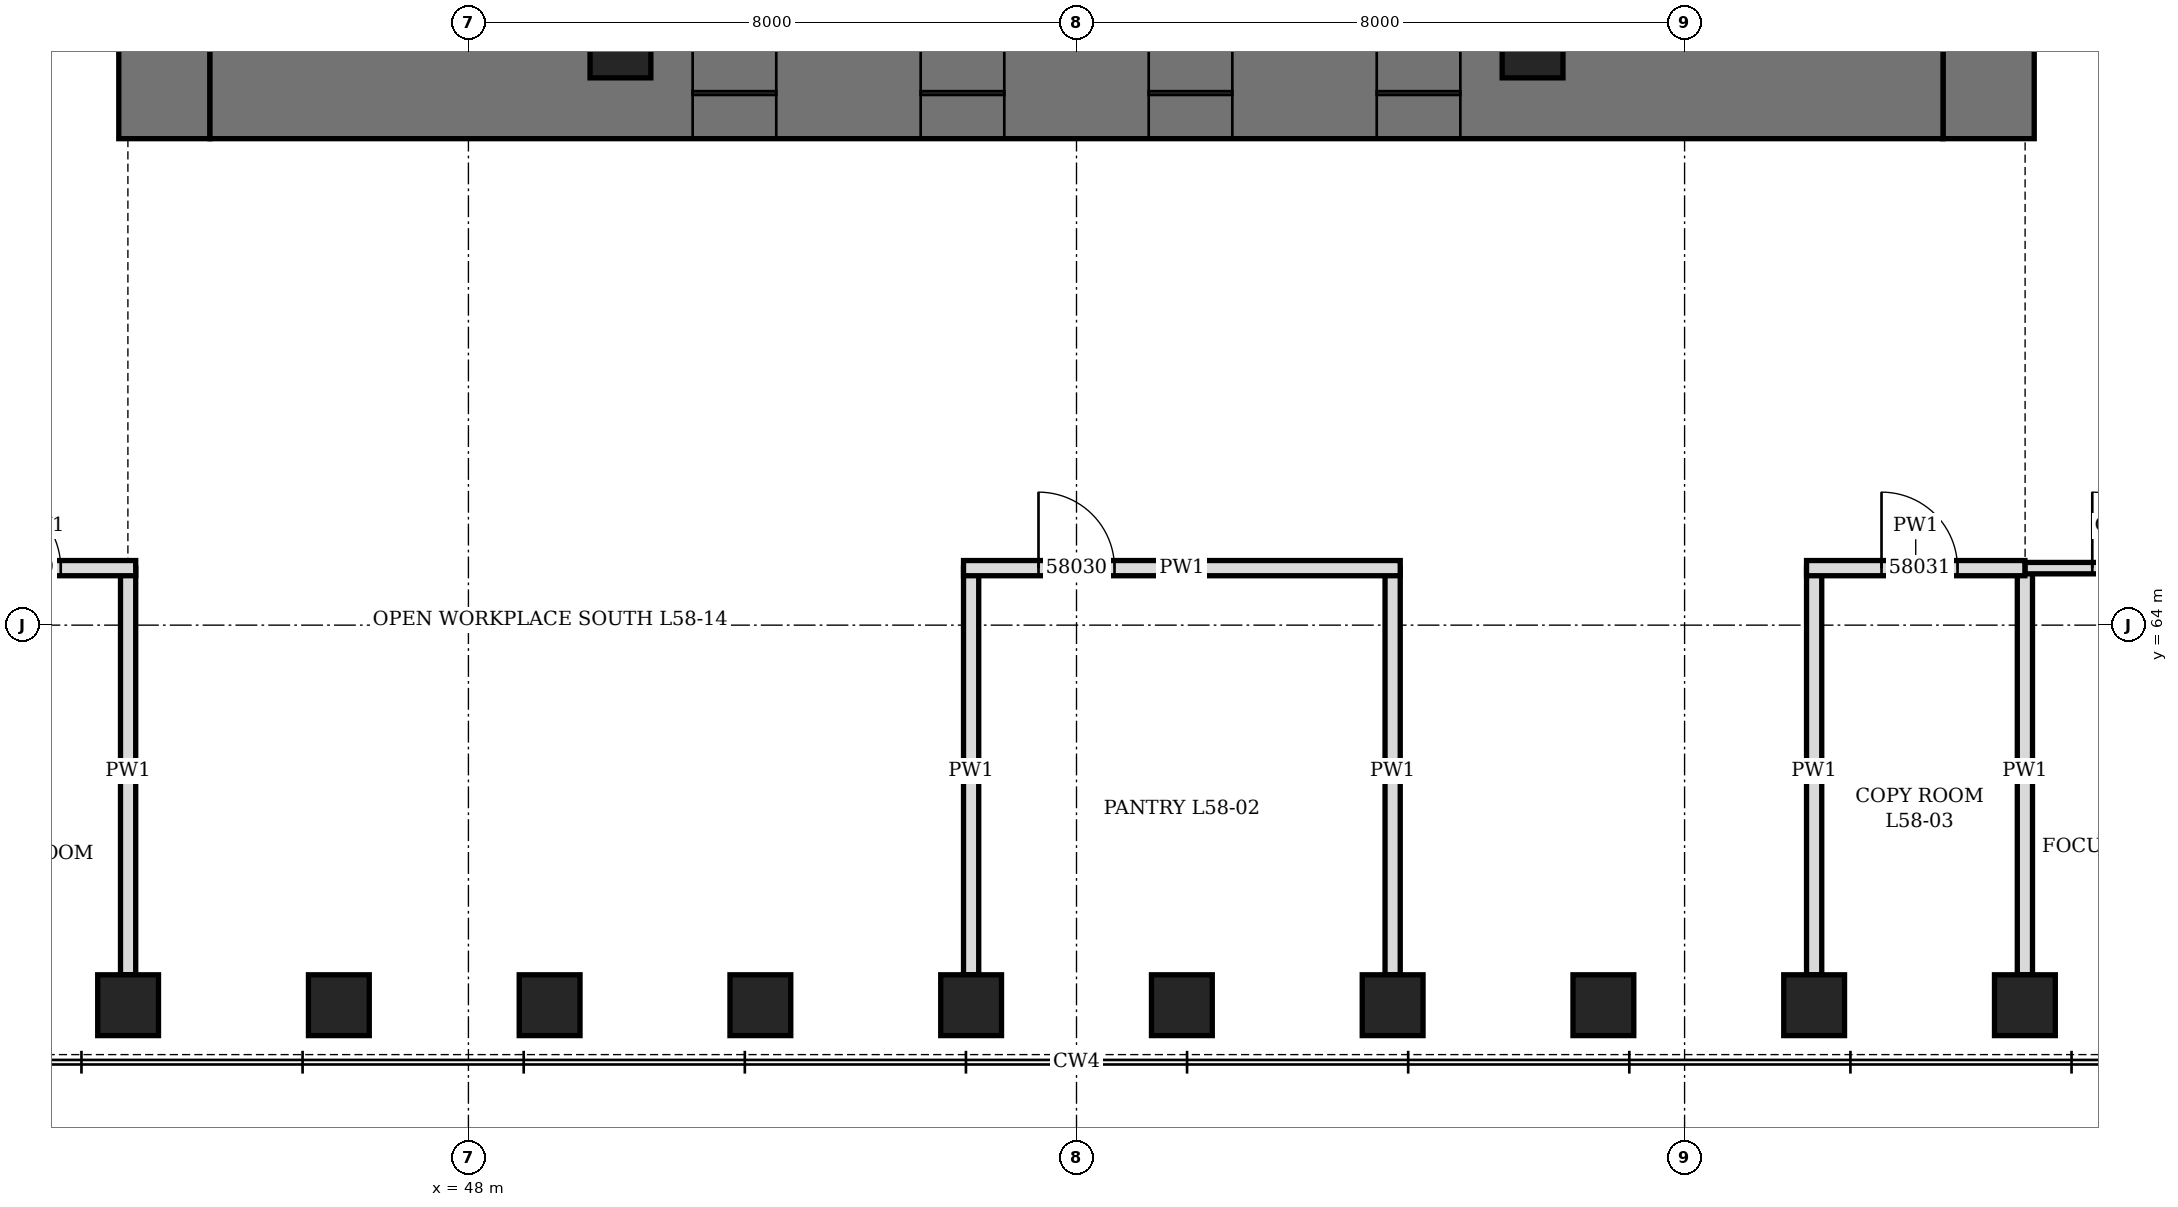
"""IFC4 building model, lengths in metres.
Left out: names, types, materials, properties, quantities, classifications, styles, units other than length and angle.
Written with IfcOpenShell. Run it as: python <this file> out.ifc"""

import sys

from ifc_helpers import new_model, si_unit, direction, frame, frame_2d, origin, origin_2d, place, context, subcontext, project, spatial, rectangle, hollow_rectangle, extrude, element, fill, save


model = new_model("IFC4")
c1 = context("Model", 3, precision=1e-05, world=origin(), true_north=direction((0.0, 1.0)))
c2 = subcontext(c1, "Body", "Model", "MODEL_VIEW")
j1 = project(units=[si_unit("LENGTHUNIT", "METRE"), si_unit("PLANEANGLEUNIT", "RADIAN")], contexts=[c1])
p1 = place(None, origin())
s1 = spatial("IfcSite", under=j1, at=p1, CompositionType="ELEMENT")
p2 = place(p1, origin())
s2 = spatial("IfcBuilding", under=s1, at=p2, CompositionType="ELEMENT")
p3 = place(p2, frame((0.0, 0.0, 258.7)))
s3 = spatial("IfcBuildingStorey", under=s2, at=p3, CompositionType="ELEMENT", Elevation=258.7)
for number, where, z_axis, x_axis in (
    (1, (43.523, 59.0, 0.0), (0.0, 0.0, 1.0), (1.0, 0.0, 0.0)),
    (2, (46.295, 59.0, 0.0), (0.0, 0.0, 1.0), (1.0, 0.0, 0.0)),
    (3, (49.068, 59.0, 0.0), (0.0, 0.0, 1.0), (1.0, 0.0, 0.0)),
    (4, (51.841, 59.0, 0.0), (0.0, 0.0, 1.0), (1.0, 0.0, 0.0)),
    (5, (54.614, 59.0, 0.0), (0.0, 0.0, 1.0), (1.0, 0.0, 0.0)),
    (6, (57.386, 59.0, 0.0), (0.0, 0.0, 1.0), (1.0, 0.0, 0.0)),
    (7, (60.159, 59.0, 0.0), (0.0, 0.0, 1.0), (1.0, 0.0, 0.0)),
    (8, (62.932, 59.0, 0.0), (0.0, 0.0, 1.0), (1.0, 0.0, 0.0)),
    (9, (65.705, 59.0, 0.0), (0.0, 0.0, 1.0), (1.0, 0.0, 0.0)),
    (10, (68.477, 59.0, 0.0), (0.0, 0.0, 1.0), (1.0, 0.0, 0.0)),
):
    element("IfcColumn", number, at=place(p3, frame(where, z_axis=z_axis, x_axis=x_axis)), inside=s3, PredefinedType="COLUMN", context=c2, shape_type="SweptSolid", body=[
        extrude(hollow_rectangle(XDim=0.8, YDim=0.8, WallThickness=0.1, at=origin_2d()), origin(), (0.0, 0.0, 1.0), 4.2),
    ])
p4 = place(p3, frame((44.0, 70.4, 0.0), z_axis=(0.0, 0.0, 1.0), x_axis=(0.0, 1.0, 0.0)))
e11 = element("IfcWall", 11, at=p4, inside=s3, PredefinedType="SHEAR", context=c2, shape_type="SweptSolid", body=[
    extrude(rectangle(XDim=19.2, YDim=1.2, at=frame_2d((9.6, 0.0))), origin(), (0.0, 0.0, 1.0), 4.2),
])
p5 = place(p4, frame((8.6, 0.0, 0.0)))
e12 = element("IfcOpeningElement", 12, at=p5, cuts=e11, PredefinedType="OPENING", context=c2, shape_type="SweptSolid", body=[
    extrude(rectangle(XDim=2.0, YDim=2.4, at=frame_2d((1.0, 1.2))), frame((0.0, 0.61, 0.0), z_axis=(0.0, -1.0, 0.0), x_axis=(1.0, 0.0, 0.0)), (0.0, 0.0, 1.0), 1.22),
])
p6 = place(p3, frame((68.0, 70.4, 0.0), z_axis=(0.0, 0.0, 1.0), x_axis=(0.0, 1.0, 0.0)))
e13 = element("IfcWall", 13, at=p6, inside=s3, PredefinedType="SHEAR", context=c2, shape_type="SweptSolid", body=[
    extrude(rectangle(XDim=19.2, YDim=1.2, at=frame_2d((9.6, 0.0))), origin(), (0.0, 0.0, 1.0), 4.2),
])
p7 = place(p6, frame((8.6, 0.0, 0.0)))
e14 = element("IfcOpeningElement", 14, at=p7, cuts=e13, PredefinedType="OPENING", context=c2, shape_type="SweptSolid", body=[
    extrude(rectangle(XDim=2.0, YDim=2.4, at=frame_2d((1.0, 1.2))), frame((0.0, 0.61, 0.0), z_axis=(0.0, -1.0, 0.0), x_axis=(1.0, 0.0, 0.0)), (0.0, 0.0, 1.0), 1.22),
])
p8 = place(p3, frame((44.6, 71.0, 0.0), z_axis=(0.0, 0.0, 1.0), x_axis=(1.0, 0.0, 0.0)))
e15 = element("IfcWall", 15, at=p8, inside=s3, PredefinedType="SHEAR", context=c2, shape_type="SweptSolid", body=[
    extrude(rectangle(XDim=22.8, YDim=1.2, at=frame_2d((11.4, 0.0))), origin(), (0.0, 0.0, 1.0), 4.2),
])
p9 = place(p8, frame((6.35, 0.0, 0.0)))
e16 = element("IfcOpeningElement", 16, at=p9, cuts=e15, PredefinedType="OPENING", context=c2, shape_type="SweptSolid", body=[
    extrude(rectangle(XDim=1.1, YDim=2.2, at=frame_2d((0.55, 1.1))), frame((0.0, 0.61, 0.0), z_axis=(0.0, -1.0, 0.0), x_axis=(1.0, 0.0, 0.0)), (0.0, 0.0, 1.0), 1.22),
])
p10 = place(p8, frame((9.35, 0.0, 0.0)))
e17 = element("IfcOpeningElement", 17, at=p10, cuts=e15, PredefinedType="OPENING", context=c2, shape_type="SweptSolid", body=[
    extrude(rectangle(XDim=1.1, YDim=2.2, at=frame_2d((0.55, 1.1))), frame((0.0, 0.61, 0.0), z_axis=(0.0, -1.0, 0.0), x_axis=(1.0, 0.0, 0.0)), (0.0, 0.0, 1.0), 1.22),
])
p11 = place(p8, frame((12.35, 0.0, 0.0)))
e18 = element("IfcOpeningElement", 18, at=p11, cuts=e15, PredefinedType="OPENING", context=c2, shape_type="SweptSolid", body=[
    extrude(rectangle(XDim=1.1, YDim=2.2, at=frame_2d((0.55, 1.1))), frame((0.0, 0.61, 0.0), z_axis=(0.0, -1.0, 0.0), x_axis=(1.0, 0.0, 0.0)), (0.0, 0.0, 1.0), 1.22),
])
p12 = place(p8, frame((15.35, 0.0, 0.0)))
e19 = element("IfcOpeningElement", 19, at=p12, cuts=e15, PredefinedType="OPENING", context=c2, shape_type="SweptSolid", body=[
    extrude(rectangle(XDim=1.1, YDim=2.2, at=frame_2d((0.55, 1.1))), frame((0.0, 0.61, 0.0), z_axis=(0.0, -1.0, 0.0), x_axis=(1.0, 0.0, 0.0)), (0.0, 0.0, 1.0), 1.22),
])
for number, where, z_axis, x_axis in (
    (20, (50.0, 71.6, 0.0), (0.0, 0.0, 1.0), (1.0, 0.0, 0.0)),
    (21, (62.0, 71.6, 0.0), (0.0, 0.0, 1.0), (1.0, 0.0, 0.0)),
):
    element("IfcColumn", number, at=place(p3, frame(where, z_axis=z_axis, x_axis=x_axis)), inside=s3, PredefinedType="COLUMN", context=c2, shape_type="SweptSolid", body=[
        extrude(hollow_rectangle(XDim=0.8, YDim=0.8, WallThickness=0.1, at=origin_2d()), origin(), (0.0, 0.0, 1.0), 4.2),
    ])
for number, where, z_axis, x_axis in (
    (22, (43.523, 59.4, 0.0), (0.0, 0.0, 1.0), (0.0, 1.0, 0.0)),
    (23, (54.614, 59.4, 0.0), (0.0, 0.0, 1.0), (0.0, 1.0, 0.0)),
    (24, (60.159, 59.4, 0.0), (0.0, 0.0, 1.0), (0.0, 1.0, 0.0)),
    (25, (65.705, 59.4, 0.0), (0.0, 0.0, 1.0), (0.0, 1.0, 0.0)),
    (26, (68.477, 59.4, 0.0), (0.0, 0.0, 1.0), (0.0, 1.0, 0.0)),
):
    element("IfcWall", number, at=place(p3, frame(where, z_axis=z_axis, x_axis=x_axis)), inside=s3, PredefinedType="PARTITIONING", context=c2, shape_type="SweptSolid", body=[
        extrude(rectangle(XDim=5.35, YDim=0.2, at=frame_2d((2.675, 0.0))), origin(), (0.0, 0.0, 1.0), 3.428),
    ])
p13 = place(p3, frame((68.477, 64.75, 0.0), z_axis=(0.0, 0.0, 1.0), x_axis=(1.0, 0.0, 0.0)))
e27 = element("IfcWall", 27, at=p13, inside=s3, PredefinedType="PARTITIONING", context=c2, shape_type="SweptSolid", body=[
    extrude(rectangle(XDim=2.373, YDim=0.15, at=frame_2d((1.187, 0.0))), origin(), (0.0, 0.0, 1.0), 4.04),
])
p14 = place(p13, frame((0.886, 0.0, 0.0)))
e28 = element("IfcOpeningElement", 28, at=p14, cuts=e27, PredefinedType="OPENING", context=c2, shape_type="SweptSolid", body=[
    extrude(rectangle(XDim=1.0, YDim=2.4, at=frame_2d((0.5, 1.2))), frame((0.0, 0.085, 0.0), z_axis=(0.0, -1.0, 0.0), x_axis=(1.0, 0.0, 0.0)), (0.0, 0.0, 1.0), 0.17),
])
p15 = place(p3, frame((41.15, 64.75, 0.0), z_axis=(0.0, 0.0, 1.0), x_axis=(1.0, 0.0, 0.0)))
e29 = element("IfcWall", 29, at=p15, inside=s3, PredefinedType="PARTITIONING", context=c2, shape_type="SweptSolid", body=[
    extrude(rectangle(XDim=2.473, YDim=0.2, at=frame_2d((1.236, 0.0))), origin(), (0.0, 0.0, 1.0), 4.04),
])
p16 = place(p15, frame((0.486, 0.0, 0.0)))
e30 = element("IfcOpeningElement", 30, at=p16, cuts=e29, PredefinedType="OPENING", context=c2, shape_type="SweptSolid", body=[
    extrude(rectangle(XDim=1.0, YDim=2.1, at=frame_2d((0.5, 1.05))), frame((0.0, 0.11, 0.0), z_axis=(0.0, -1.0, 0.0), x_axis=(1.0, 0.0, 0.0)), (0.0, 0.0, 1.0), 0.22),
])
p17 = place(p3, frame((54.514, 64.75, 0.0), z_axis=(0.0, 0.0, 1.0), x_axis=(1.0, 0.0, 0.0)))
e31 = element("IfcWall", 31, at=p17, inside=s3, PredefinedType="PARTITIONING", context=c2, shape_type="SweptSolid", body=[
    extrude(rectangle(XDim=5.745, YDim=0.2, at=frame_2d((2.873, 0.0))), origin(), (0.0, 0.0, 1.0), 4.04),
])
p18 = place(p17, frame((0.986, 0.0, 0.0)))
e32 = element("IfcOpeningElement", 32, at=p18, cuts=e31, PredefinedType="OPENING", context=c2, shape_type="SweptSolid", body=[
    extrude(rectangle(XDim=1.0, YDim=2.1, at=frame_2d((0.5, 1.05))), frame((0.0, 0.11, 0.0), z_axis=(0.0, -1.0, 0.0), x_axis=(1.0, 0.0, 0.0)), (0.0, 0.0, 1.0), 0.22),
])
p19 = place(p3, frame((65.604, 64.75, 0.0), z_axis=(0.0, 0.0, 1.0), x_axis=(1.0, 0.0, 0.0)))
e33 = element("IfcWall", 33, at=p19, inside=s3, PredefinedType="PARTITIONING", context=c2, shape_type="SweptSolid", body=[
    extrude(rectangle(XDim=2.873, YDim=0.2, at=frame_2d((1.437, 0.0))), origin(), (0.0, 0.0, 1.0), 4.04),
])
p20 = place(p19, frame((0.986, 0.0, 0.0)))
e34 = element("IfcOpeningElement", 34, at=p20, cuts=e33, PredefinedType="OPENING", context=c2, shape_type="SweptSolid", body=[
    extrude(rectangle(XDim=1.0, YDim=2.1, at=frame_2d((0.5, 1.05))), frame((0.0, 0.11, 0.0), z_axis=(0.0, -1.0, 0.0), x_axis=(1.0, 0.0, 0.0)), (0.0, 0.0, 1.0), 0.22),
])
p21 = place(p9, origin())
e35 = element("IfcDoor", 35, at=p21, inside=s3, OperationType="SLIDING_TO_LEFT", PredefinedType="DOOR", context=c2, shape_type="SweptSolid", body=[
    extrude(rectangle(XDim=1.1, YDim=2.2, at=frame_2d((0.55, 1.1))), frame((0.0, 0.35, 0.0), z_axis=(0.0, -1.0, 0.0), x_axis=(1.0, 0.0, 0.0)), (0.0, 0.0, 1.0), 0.7),
])
fill(e16, e35)
p22 = place(p10, origin())
e36 = element("IfcDoor", 36, at=p22, inside=s3, OperationType="SLIDING_TO_LEFT", PredefinedType="DOOR", context=c2, shape_type="SweptSolid", body=[
    extrude(rectangle(XDim=1.1, YDim=2.2, at=frame_2d((0.55, 1.1))), frame((0.0, 0.35, 0.0), z_axis=(0.0, -1.0, 0.0), x_axis=(1.0, 0.0, 0.0)), (0.0, 0.0, 1.0), 0.7),
])
fill(e17, e36)
p23 = place(p11, origin())
e37 = element("IfcDoor", 37, at=p23, inside=s3, OperationType="SLIDING_TO_LEFT", PredefinedType="DOOR", context=c2, shape_type="SweptSolid", body=[
    extrude(rectangle(XDim=1.1, YDim=2.2, at=frame_2d((0.55, 1.1))), frame((0.0, 0.35, 0.0), z_axis=(0.0, -1.0, 0.0), x_axis=(1.0, 0.0, 0.0)), (0.0, 0.0, 1.0), 0.7),
])
fill(e18, e37)
p24 = place(p12, origin())
e38 = element("IfcDoor", 38, at=p24, inside=s3, OperationType="SLIDING_TO_LEFT", PredefinedType="DOOR", context=c2, shape_type="SweptSolid", body=[
    extrude(rectangle(XDim=1.1, YDim=2.2, at=frame_2d((0.55, 1.1))), frame((0.0, 0.35, 0.0), z_axis=(0.0, -1.0, 0.0), x_axis=(1.0, 0.0, 0.0)), (0.0, 0.0, 1.0), 0.7),
])
fill(e19, e38)
p25 = place(p16, origin())
e39 = element("IfcDoor", 39, at=p25, inside=s3, OperationType="SINGLE_SWING_LEFT", PredefinedType="DOOR", context=c2, shape_type="SweptSolid", body=[
    extrude(rectangle(XDim=1.0, YDim=2.1, at=frame_2d((0.5, 1.05))), frame((0.0, 0.1, 0.0), z_axis=(0.0, -1.0, 0.0), x_axis=(1.0, 0.0, 0.0)), (0.0, 0.0, 1.0), 0.199),
])
fill(e30, e39)
p26 = place(p18, origin())
e40 = element("IfcDoor", 40, at=p26, inside=s3, OperationType="SINGLE_SWING_LEFT", PredefinedType="DOOR", context=c2, shape_type="SweptSolid", body=[
    extrude(rectangle(XDim=1.0, YDim=2.1, at=frame_2d((0.5, 1.05))), frame((0.0, 0.1, 0.0), z_axis=(0.0, -1.0, 0.0), x_axis=(1.0, 0.0, 0.0)), (0.0, 0.0, 1.0), 0.199),
])
fill(e32, e40)
p27 = place(p20, origin())
e41 = element("IfcDoor", 41, at=p27, inside=s3, OperationType="SINGLE_SWING_LEFT", PredefinedType="DOOR", context=c2, shape_type="SweptSolid", body=[
    extrude(rectangle(XDim=1.0, YDim=2.1, at=frame_2d((0.5, 1.05))), frame((0.0, 0.1, 0.0), z_axis=(0.0, -1.0, 0.0), x_axis=(1.0, 0.0, 0.0)), (0.0, 0.0, 1.0), 0.199),
])
fill(e34, e41)
p28 = place(p14, origin())
e42 = element("IfcDoor", 42, at=p28, inside=s3, OperationType="SINGLE_SWING_RIGHT", PredefinedType="DOOR", context=c2, shape_type="SweptSolid", body=[
    extrude(rectangle(XDim=1.0, YDim=2.4, at=frame_2d((0.5, 1.2))), frame((0.0, 0.075, 0.0), z_axis=(0.0, -1.0, 0.0), x_axis=(1.0, 0.0, 0.0)), (0.0, 0.0, 1.0), 0.149),
])
fill(e28, e42)
save(model, sys.argv[1])
